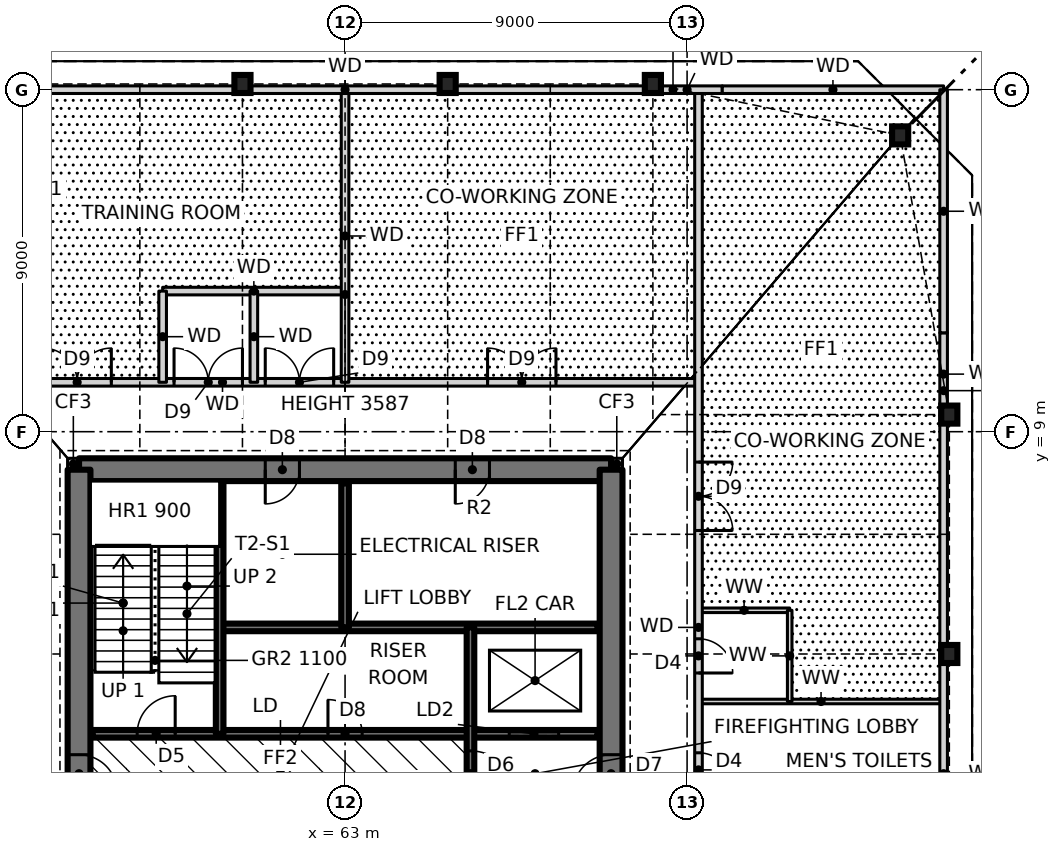
"""IFC4 building model, lengths in metres.
Left out: names, types, materials, properties, quantities, classifications, styles, units other than length and angle.
Written with IfcOpenShell. Run it as: python <this file> out.ifc"""

import sys

from ifc_helpers import new_model, si_unit, direction, frame, frame_2d, origin, origin_2d, place, context, subcontext, project, spatial, rectangle, i_section, extrude, element, fill, save


model = new_model("IFC4")
c1 = context("Model", 3, precision=1e-05, world=origin(), true_north=direction((0.0, 1.0)))
c2 = subcontext(c1, "Body", "Model", "MODEL_VIEW")
j1 = project(units=[si_unit("LENGTHUNIT", "METRE"), si_unit("PLANEANGLEUNIT", "RADIAN")], contexts=[c1])
p1 = place(None, origin())
s1 = spatial("IfcSite", under=j1, at=p1, CompositionType="ELEMENT")
p2 = place(p1, origin())
s2 = spatial("IfcBuilding", under=s1, at=p2, CompositionType="ELEMENT")
p3 = place(p2, frame((0.0, 0.0, 10.5)))
s3 = spatial("IfcBuildingStorey", under=s2, at=p3, CompositionType="ELEMENT", Elevation=10.5)
for number, where, z_axis, x_axis in (
    (1, (78.9, 3.15, 0.0), (0.0, 0.0, 1.0), (1.0, 0.0, 0.0)),
    (2, (78.9, 9.45, 0.0), (0.0, 0.0, 1.0), (1.0, 0.0, 0.0)),
    (3, (77.606, 16.797, 0.0), (0.0, 0.0, 1.0), (1.0, 0.0, 0.0)),
    (4, (71.1, 18.15, 0.0), (0.0, 0.0, 1.0), (1.0, 0.0, 0.0)),
    (5, (65.7, 18.15, 0.0), (0.0, 0.0, 1.0), (1.0, 0.0, 0.0)),
    (6, (60.3, 18.15, 0.0), (0.0, 0.0, 1.0), (1.0, 0.0, 0.0)),
):
    element("IfcColumn", number, at=place(p3, frame(where, z_axis=z_axis, x_axis=x_axis)), inside=s3, PredefinedType="COLUMN", context=c2, shape_type="SweptSolid", body=[
        extrude(i_section(OverallWidth=0.424, OverallDepth=0.475, WebThickness=0.048, FlangeThickness=0.077, at=origin_2d()), origin(), (0.0, 0.0, 1.0), 4.5),
    ])
for number, where, z_axis, x_axis in (
    (7, (70.0, 8.15, 0.0), (0.0, 0.0, 1.0), (1.0, 0.0, 0.0)),
    (8, (55.7, 8.15, 0.0), (0.0, 0.0, 1.0), (1.0, 0.0, 0.0)),
):
    element("IfcWall", number, at=place(p3, frame(where, z_axis=z_axis, x_axis=x_axis)), inside=s3, PredefinedType="SOLIDWALL", context=c2, shape_type="SweptSolid", body=[
        extrude(rectangle(XDim=0.3, YDim=0.3, at=frame_2d((0.15, 0.0))), origin(), (0.0, 0.0, 1.0), 4.5),
    ])
p4 = place(p3, frame((70.0, 8.0, 0.0), z_axis=(0.0, 0.0, 1.0), x_axis=(-1.0, 0.0, 0.0)))
e9 = element("IfcWall", 9, at=p4, inside=s3, PredefinedType="SHEAR", context=c2, shape_type="SweptSolid", body=[
    extrude(rectangle(XDim=14.0, YDim=0.6, at=frame_2d((7.0, 0.0))), origin(), (0.0, 0.0, 1.0), 4.5),
])
p5 = place(p4, frame((8.2, 0.0, 0.0)))
e10 = element("IfcOpeningElement", 10, at=p5, cuts=e9, PredefinedType="OPENING", context=c2, shape_type="SweptSolid", body=[
    extrude(rectangle(XDim=0.9, YDim=2.1, at=frame_2d((0.45, 1.05))), frame((0.0, 0.31, 0.0), z_axis=(0.0, -1.0, 0.0), x_axis=(1.0, 0.0, 0.0)), (0.0, 0.0, 1.0), 0.62),
])
p6 = place(p4, frame((3.2, 0.0, 0.0)))
e11 = element("IfcOpeningElement", 11, at=p6, cuts=e9, PredefinedType="OPENING", context=c2, shape_type="SweptSolid", body=[
    extrude(rectangle(XDim=0.9, YDim=2.1, at=frame_2d((0.45, 1.05))), frame((0.0, 0.31, 0.0), z_axis=(0.0, -1.0, 0.0), x_axis=(1.0, 0.0, 0.0)), (0.0, 0.0, 1.0), 0.62),
])
p7 = place(p3, frame((70.0, -8.0, 0.0), z_axis=(0.0, 0.0, 1.0), x_axis=(0.0, 1.0, 0.0)))
e12 = element("IfcWall", 12, at=p7, inside=s3, PredefinedType="SHEAR", context=c2, shape_type="SweptSolid", body=[
    extrude(rectangle(XDim=16.0, YDim=0.6, at=frame_2d((8.0, 0.0))), origin(), (0.0, 0.0, 1.0), 4.5),
])
p8 = place(p7, frame((7.5, 0.0, 0.0)))
e13 = element("IfcOpeningElement", 13, at=p8, cuts=e12, PredefinedType="OPENING", context=c2, shape_type="SweptSolid", body=[
    extrude(rectangle(XDim=1.0, YDim=2.1, at=frame_2d((0.5, 1.05))), frame((0.0, 0.31, 0.0), z_axis=(0.0, -1.0, 0.0), x_axis=(1.0, 0.0, 0.0)), (0.0, 0.0, 1.0), 0.62),
])
p9 = place(p3, frame((56.0, 8.0, 0.0), z_axis=(0.0, 0.0, 1.0), x_axis=(0.0, -1.0, 0.0)))
e14 = element("IfcWall", 14, at=p9, inside=s3, PredefinedType="SHEAR", context=c2, shape_type="SweptSolid", body=[
    extrude(rectangle(XDim=16.0, YDim=0.6, at=frame_2d((8.0, 0.0))), origin(), (0.0, 0.0, 1.0), 4.5),
])
p10 = place(p9, frame((7.5, 0.0, 0.0)))
e15 = element("IfcOpeningElement", 15, at=p10, cuts=e14, PredefinedType="OPENING", context=c2, shape_type="SweptSolid", body=[
    extrude(rectangle(XDim=1.0, YDim=2.1, at=frame_2d((0.5, 1.05))), frame((0.0, 0.31, 0.0), z_axis=(0.0, -1.0, 0.0), x_axis=(1.0, 0.0, 0.0)), (0.0, 0.0, 1.0), 0.62),
])
p11 = place(p3, frame((56.36, 1.05, 0.0), z_axis=(0.0, 0.0, 1.0), x_axis=(1.0, 0.0, 0.0)))
e16 = element("IfcWall", 16, at=p11, inside=s3, PredefinedType="SOLIDWALL", context=c2, shape_type="SweptSolid", body=[
    extrude(rectangle(XDim=13.28, YDim=0.2, at=frame_2d((6.64, 0.0))), origin(), (0.0, 0.0, 1.0), 4.5),
])
p12 = place(p11, frame((1.17, 0.0, 0.0)))
e17 = element("IfcOpeningElement", 17, at=p12, cuts=e16, PredefinedType="OPENING", context=c2, shape_type="SweptSolid", body=[
    extrude(rectangle(XDim=1.0, YDim=2.1, at=frame_2d((0.5, 1.05))), frame((0.0, 0.11, 0.0), z_axis=(0.0, -1.0, 0.0), x_axis=(1.0, 0.0, 0.0)), (0.0, 0.0, 1.0), 0.22),
])
p13 = place(p11, frame((6.19, 0.0, 0.0)))
e18 = element("IfcOpeningElement", 18, at=p13, cuts=e16, PredefinedType="OPENING", context=c2, shape_type="SweptSolid", body=[
    extrude(rectangle(XDim=0.9, YDim=2.1, at=frame_2d((0.45, 1.05))), frame((0.0, 0.11, 0.0), z_axis=(0.0, -1.0, 0.0), x_axis=(1.0, 0.0, 0.0)), (0.0, 0.0, 1.0), 0.22),
])
p14 = place(p11, frame((10.96, 0.0, 0.0)))
e19 = element("IfcOpeningElement", 19, at=p14, cuts=e16, PredefinedType="OPENING", context=c2, shape_type="SweptSolid", body=[
    extrude(rectangle(XDim=1.3, YDim=2.1, at=frame_2d((0.65, 1.05))), frame((0.0, 0.11, 0.0), z_axis=(0.0, -1.0, 0.0), x_axis=(1.0, 0.0, 0.0)), (0.0, 0.0, 1.0), 0.22),
])
p15 = place(p3, frame((72.3, 1.9, 0.0), z_axis=(0.0, 0.0, 1.0), x_axis=(1.0, 0.0, 0.0)))
e20 = element("IfcWall", 20, at=p15, inside=s3, PredefinedType="PARTITIONING", context=c2, shape_type="SweptSolid", body=[
    extrude(rectangle(XDim=6.45, YDim=0.12, at=frame_2d((3.225, 0.0))), origin(), (0.0, 0.0, 1.0), 4.25),
])
p16 = place(p3, frame((59.7, 3.85, 0.0), z_axis=(0.0, 0.0, 1.0), x_axis=(1.0, 0.0, 0.0)))
e21 = element("IfcWall", 21, at=p16, inside=s3, PredefinedType="SOLIDWALL", context=c2, shape_type="SweptSolid", body=[
    extrude(rectangle(XDim=9.94, YDim=0.2, at=frame_2d((4.97, 0.0))), origin(), (0.0, 0.0, 1.0), 4.5),
])
p17 = place(p3, frame((72.3, 4.3, 0.0), z_axis=(0.0, 0.0, 1.0), x_axis=(1.0, 0.0, 0.0)))
e22 = element("IfcWall", 22, at=p17, inside=s3, PredefinedType="PARTITIONING", context=c2, shape_type="SweptSolid", body=[
    extrude(rectangle(XDim=2.4, YDim=0.12, at=frame_2d((1.2, 0.0))), origin(), (0.0, 0.0, 1.0), 4.25),
])
p18 = place(p3, frame((47.25, 10.3, 0.0), z_axis=(0.0, 0.0, 1.0), x_axis=(1.0, 0.0, 0.0)))
e23 = element("IfcWall", 23, at=p18, inside=s3, PredefinedType="SOLIDWALL", context=c2, shape_type="SweptSolid", body=[
    extrude(rectangle(XDim=25.05, YDim=0.2, at=frame_2d((12.525, 0.0))), origin(), (0.0, 0.0, 1.0), 4.25),
])
p19 = place(p18, frame((19.5, 0.0, 0.0)))
e24 = element("IfcOpeningElement", 24, at=p19, cuts=e23, PredefinedType="OPENING", context=c2, shape_type="SweptSolid", body=[
    extrude(rectangle(XDim=1.8, YDim=2.1, at=frame_2d((0.9, 1.05))), frame((0.0, 0.11, 0.0), z_axis=(0.0, -1.0, 0.0), x_axis=(1.0, 0.0, 0.0)), (0.0, 0.0, 1.0), 0.22),
])
p20 = place(p18, frame((13.65, 0.0, 0.0)))
e25 = element("IfcOpeningElement", 25, at=p20, cuts=e23, PredefinedType="OPENING", context=c2, shape_type="SweptSolid", body=[
    extrude(rectangle(XDim=1.8, YDim=2.1, at=frame_2d((0.9, 1.05))), frame((0.0, 0.11, 0.0), z_axis=(0.0, -1.0, 0.0), x_axis=(1.0, 0.0, 0.0)), (0.0, 0.0, 1.0), 0.22),
])
p21 = place(p18, frame((11.25, 0.0, 0.0)))
e26 = element("IfcOpeningElement", 26, at=p21, cuts=e23, PredefinedType="OPENING", context=c2, shape_type="SweptSolid", body=[
    extrude(rectangle(XDim=1.8, YDim=2.1, at=frame_2d((0.9, 1.05))), frame((0.0, 0.11, 0.0), z_axis=(0.0, -1.0, 0.0), x_axis=(1.0, 0.0, 0.0)), (0.0, 0.0, 1.0), 0.22),
])
p22 = place(p18, frame((7.8, 0.0, 0.0)))
e27 = element("IfcOpeningElement", 27, at=p22, cuts=e23, PredefinedType="OPENING", context=c2, shape_type="SweptSolid", body=[
    extrude(rectangle(XDim=1.8, YDim=2.1, at=frame_2d((0.9, 1.05))), frame((0.0, 0.11, 0.0), z_axis=(0.0, -1.0, 0.0), x_axis=(1.0, 0.0, 0.0)), (0.0, 0.0, 1.0), 0.22),
])
p23 = place(p3, frame((58.2, 12.7, 0.0), z_axis=(0.0, 0.0, 1.0), x_axis=(1.0, 0.0, 0.0)))
e28 = element("IfcWall", 28, at=p23, inside=s3, PredefinedType="SOLIDWALL", context=c2, shape_type="SweptSolid", body=[
    extrude(rectangle(XDim=4.8, YDim=0.2, at=frame_2d((2.4, 0.0))), origin(), (0.0, 0.0, 1.0), 4.25),
])
p24 = place(p3, frame((74.7, 1.9, 0.0), z_axis=(0.0, 0.0, 1.0), x_axis=(0.0, 1.0, 0.0)))
e29 = element("IfcWall", 29, at=p24, inside=s3, PredefinedType="PARTITIONING", context=c2, shape_type="SweptSolid", body=[
    extrude(rectangle(XDim=2.4, YDim=0.12, at=frame_2d((1.2, 0.0))), origin(), (0.0, 0.0, 1.0), 4.25),
])
p25 = place(p3, frame((72.3, -10.3, 0.0), z_axis=(0.0, 0.0, 1.0), x_axis=(0.0, 1.0, 0.0)))
e30 = element("IfcWall", 30, at=p25, inside=s3, PredefinedType="SOLIDWALL", context=c2, shape_type="SweptSolid", body=[
    extrude(rectangle(XDim=28.3, YDim=0.2, at=frame_2d((14.15, 0.0))), origin(), (0.0, 0.0, 1.0), 4.25),
])
p26 = place(p25, frame((1.6, 0.0, 0.0)))
e31 = element("IfcOpeningElement", 31, at=p26, cuts=e30, PredefinedType="OPENING", context=c2, shape_type="SweptSolid", body=[
    extrude(rectangle(XDim=1.8, YDim=2.1, at=frame_2d((0.9, 1.05))), frame((0.0, 0.11, 0.0), z_axis=(0.0, -1.0, 0.0), x_axis=(1.0, 0.0, 0.0)), (0.0, 0.0, 1.0), 0.22),
])
p27 = place(p25, frame((6.35, 0.0, 0.0)))
e32 = element("IfcOpeningElement", 32, at=p27, cuts=e30, PredefinedType="OPENING", context=c2, shape_type="SweptSolid", body=[
    extrude(rectangle(XDim=0.9, YDim=2.1, at=frame_2d((0.45, 1.05))), frame((0.0, 0.11, 0.0), z_axis=(0.0, -1.0, 0.0), x_axis=(1.0, 0.0, 0.0)), (0.0, 0.0, 1.0), 0.22),
])
p28 = place(p25, frame((9.95, 0.0, 0.0)))
e33 = element("IfcOpeningElement", 33, at=p28, cuts=e30, PredefinedType="OPENING", context=c2, shape_type="SweptSolid", body=[
    extrude(rectangle(XDim=0.9, YDim=2.1, at=frame_2d((0.45, 1.05))), frame((0.0, 0.11, 0.0), z_axis=(0.0, -1.0, 0.0), x_axis=(1.0, 0.0, 0.0)), (0.0, 0.0, 1.0), 0.22),
])
p29 = place(p25, frame((12.95, 0.0, 0.0)))
e34 = element("IfcOpeningElement", 34, at=p29, cuts=e30, PredefinedType="OPENING", context=c2, shape_type="SweptSolid", body=[
    extrude(rectangle(XDim=0.9, YDim=2.1, at=frame_2d((0.45, 1.05))), frame((0.0, 0.11, 0.0), z_axis=(0.0, -1.0, 0.0), x_axis=(1.0, 0.0, 0.0)), (0.0, 0.0, 1.0), 0.22),
])
p30 = place(p25, frame((16.7, 0.0, 0.0)))
e35 = element("IfcOpeningElement", 35, at=p30, cuts=e30, PredefinedType="OPENING", context=c2, shape_type="SweptSolid", body=[
    extrude(rectangle(XDim=1.8, YDim=2.1, at=frame_2d((0.9, 1.05))), frame((0.0, 0.11, 0.0), z_axis=(0.0, -1.0, 0.0), x_axis=(1.0, 0.0, 0.0)), (0.0, 0.0, 1.0), 0.22),
])
p31 = place(p3, frame((66.3, -7.64, 0.0), z_axis=(0.0, 0.0, 1.0), x_axis=(0.0, 1.0, 0.0)))
e36 = element("IfcWall", 36, at=p31, inside=s3, PredefinedType="SOLIDWALL", context=c2, shape_type="SweptSolid", body=[
    extrude(rectangle(XDim=11.49, YDim=0.2, at=frame_2d((5.745, 0.0))), origin(), (0.0, 0.0, 1.0), 4.5),
])
p32 = place(p31, frame((7.04, 0.0, 0.0)))
e37 = element("IfcOpeningElement", 37, at=p32, cuts=e36, PredefinedType="OPENING", context=c2, shape_type="SweptSolid", body=[
    extrude(rectangle(XDim=1.2, YDim=2.1, at=frame_2d((0.6, 1.05))), frame((0.0, 0.11, 0.0), z_axis=(0.0, -1.0, 0.0), x_axis=(1.0, 0.0, 0.0)), (0.0, 0.0, 1.0), 0.22),
])
p33 = place(p3, frame((63.0, 3.85, 0.0), z_axis=(0.0, 0.0, 1.0), x_axis=(0.0, 1.0, 0.0)))
e38 = element("IfcWall", 38, at=p33, inside=s3, PredefinedType="SOLIDWALL", context=c2, shape_type="SweptSolid", body=[
    extrude(rectangle(XDim=3.79, YDim=0.2, at=frame_2d((1.895, 0.0))), origin(), (0.0, 0.0, 1.0), 4.5),
])
p34 = place(p3, frame((63.0, 10.3, 0.0), z_axis=(0.0, 0.0, 1.0), x_axis=(0.0, 1.0, 0.0)))
e39 = element("IfcWall", 39, at=p34, inside=s3, PredefinedType="SOLIDWALL", context=c2, shape_type="SweptSolid", body=[
    extrude(rectangle(XDim=7.7, YDim=0.2, at=frame_2d((3.85, 0.0))), origin(), (0.0, 0.0, 1.0), 3.587),
])
p35 = place(p3, frame((60.6, 10.3, 0.0), z_axis=(0.0, 0.0, 1.0), x_axis=(0.0, 1.0, 0.0)))
e40 = element("IfcWall", 40, at=p35, inside=s3, PredefinedType="SOLIDWALL", context=c2, shape_type="SweptSolid", body=[
    extrude(rectangle(XDim=2.4, YDim=0.2, at=frame_2d((1.2, 0.0))), origin(), (0.0, 0.0, 1.0), 4.25),
])
p36 = place(p3, frame((59.7, 1.05, 0.0), z_axis=(0.0, 0.0, 1.0), x_axis=(0.0, 1.0, 0.0)))
e41 = element("IfcWall", 41, at=p36, inside=s3, PredefinedType="SOLIDWALL", context=c2, shape_type="SweptSolid", body=[
    extrude(rectangle(XDim=6.59, YDim=0.2, at=frame_2d((3.295, 0.0))), origin(), (0.0, 0.0, 1.0), 4.5),
])
p37 = place(p3, frame((58.2, 10.3, 0.0), z_axis=(0.0, 0.0, 1.0), x_axis=(0.0, 1.0, 0.0)))
e42 = element("IfcWall", 42, at=p37, inside=s3, PredefinedType="SOLIDWALL", context=c2, shape_type="SweptSolid", body=[
    extrude(rectangle(XDim=2.4, YDim=0.2, at=frame_2d((1.2, 0.0))), origin(), (0.0, 0.0, 1.0), 4.25),
])
p38 = place(p3, frame((54.926, 18.0, 0.0), z_axis=(0.0, 0.0, 1.0), x_axis=(1.0, 0.0, 0.0)))
e43 = element("IfcWall", 43, at=p38, inside=s3, PredefinedType="SOLIDWALL", context=c2, shape_type="SweptSolid", body=[
    extrude(rectangle(XDim=16.148, YDim=0.2, at=frame_2d((8.074, 0.0))), origin(), (0.0, 0.0, 1.0), 4.25),
])
p39 = place(p3, frame((71.074, 18.0, 0.0), z_axis=(0.0, 0.0, 1.0), x_axis=(1.0, 0.0, 0.0)))
e44 = element("IfcWall", 44, at=p39, inside=s3, PredefinedType="SOLIDWALL", context=c2, shape_type="SweptSolid", body=[
    extrude(rectangle(XDim=1.852, YDim=0.2, at=frame_2d((0.926, 0.0))), origin(), (0.0, 0.0, 1.0), 3.587),
])
p40 = place(p3, frame((72.926, 18.0, 0.0), z_axis=(0.0, 0.0, 1.0), x_axis=(1.0, 0.0, 0.0)))
e45 = element("IfcWall", 45, at=p40, inside=s3, PredefinedType="SOLIDWALL", context=c2, shape_type="SweptSolid", body=[
    extrude(rectangle(XDim=5.824, YDim=0.2, at=frame_2d((2.912, 0.0))), origin(), (0.0, 0.0, 1.0), 4.25),
])
p41 = place(p3, frame((78.75, -9.428, 0.0), z_axis=(0.0, 0.0, 1.0), x_axis=(0.0, 1.0, 0.0)))
e46 = element("IfcWall", 46, at=p41, inside=s3, PredefinedType="SOLIDWALL", context=c2, shape_type="SweptSolid", body=[
    extrude(rectangle(XDim=18.856, YDim=0.2, at=frame_2d((9.428, 0.0))), origin(), (0.0, 0.0, 1.0), 4.25),
])
p42 = place(p3, frame((78.75, 9.428, 0.0), z_axis=(0.0, 0.0, 1.0), x_axis=(0.0, 1.0, 0.0)))
e47 = element("IfcWall", 47, at=p42, inside=s3, PredefinedType="SOLIDWALL", context=c2, shape_type="SweptSolid", body=[
    extrude(rectangle(XDim=2.174, YDim=0.2, at=frame_2d((1.087, 0.0))), origin(), (0.0, 0.0, 1.0), 3.587),
])
p43 = place(p3, frame((78.75, 11.602, 0.0), z_axis=(0.0, 0.0, 1.0), x_axis=(0.0, 1.0, 0.0)))
e48 = element("IfcWall", 48, at=p43, inside=s3, PredefinedType="SOLIDWALL", context=c2, shape_type="SweptSolid", body=[
    extrude(rectangle(XDim=6.398, YDim=0.2, at=frame_2d((3.199, 0.0))), origin(), (0.0, 0.0, 1.0), 4.25),
])
p44 = place(p12, origin())
e49 = element("IfcDoor", 49, at=p44, inside=s3, OperationType="SINGLE_SWING_RIGHT", PredefinedType="DOOR", context=c2, shape_type="SweptSolid", body=[
    extrude(rectangle(XDim=1.0, YDim=2.1, at=frame_2d((0.5, 1.05))), frame((0.0, 0.025, 0.0), z_axis=(0.0, -1.0, 0.0), x_axis=(1.0, 0.0, 0.0)), (0.0, 0.0, 1.0), 0.05),
])
fill(e17, e49)
p45 = place(p32, frame((1.2, 0.0, 0.0), z_axis=(0.0, 0.0, 1.0), x_axis=(-1.0, 0.0, 0.0)))
e50 = element("IfcDoor", 50, at=p45, inside=s3, OperationType="SINGLE_SWING_RIGHT", PredefinedType="DOOR", context=c2, shape_type="SweptSolid", body=[
    extrude(rectangle(XDim=1.2, YDim=2.1, at=frame_2d((0.6, 1.05))), frame((0.0, 0.025, 0.0), z_axis=(0.0, -1.0, 0.0), x_axis=(1.0, 0.0, 0.0)), (0.0, 0.0, 1.0), 0.05),
])
fill(e37, e50)
p46 = place(p13, origin())
e51 = element("IfcDoor", 51, at=p46, inside=s3, OperationType="SINGLE_SWING_LEFT", PredefinedType="DOOR", context=c2, shape_type="SweptSolid", body=[
    extrude(rectangle(XDim=0.9, YDim=2.1, at=frame_2d((0.45, 1.05))), frame((0.0, 0.025, 0.0), z_axis=(0.0, -1.0, 0.0), x_axis=(1.0, 0.0, 0.0)), (0.0, 0.0, 1.0), 0.05),
])
fill(e18, e51)
p47 = place(p28, frame((0.9, 0.0, 0.0), z_axis=(0.0, 0.0, 1.0), x_axis=(-1.0, 0.0, 0.0)))
e52 = element("IfcDoor", 52, at=p47, inside=s3, OperationType="SINGLE_SWING_RIGHT", PredefinedType="DOOR", context=c2, shape_type="SweptSolid", body=[
    extrude(rectangle(XDim=0.9, YDim=2.1, at=frame_2d((0.45, 1.05))), frame((0.0, 0.025, 0.0), z_axis=(0.0, -1.0, 0.0), x_axis=(1.0, 0.0, 0.0)), (0.0, 0.0, 1.0), 0.05),
])
fill(e33, e52)
p48 = place(p29, frame((0.9, 0.0, 0.0), z_axis=(0.0, 0.0, 1.0), x_axis=(-1.0, 0.0, 0.0)))
e53 = element("IfcDoor", 53, at=p48, inside=s3, OperationType="SINGLE_SWING_RIGHT", PredefinedType="DOOR", context=c2, shape_type="SweptSolid", body=[
    extrude(rectangle(XDim=0.9, YDim=2.1, at=frame_2d((0.45, 1.05))), frame((0.0, 0.025, 0.0), z_axis=(0.0, -1.0, 0.0), x_axis=(1.0, 0.0, 0.0)), (0.0, 0.0, 1.0), 0.05),
])
fill(e34, e53)
p49 = place(p30, frame((1.8, 0.0, 0.0), z_axis=(0.0, 0.0, 1.0), x_axis=(-1.0, 0.0, 0.0)))
e54 = element("IfcDoor", 54, at=p49, inside=s3, OperationType="DOUBLE_DOOR_SINGLE_SWING", PredefinedType="DOOR", context=c2, shape_type="SweptSolid", body=[
    extrude(rectangle(XDim=1.8, YDim=2.1, at=frame_2d((0.9, 1.05))), frame((0.0, 0.025, 0.0), z_axis=(0.0, -1.0, 0.0), x_axis=(1.0, 0.0, 0.0)), (0.0, 0.0, 1.0), 0.05),
])
fill(e35, e54)
p50 = place(p19, origin())
e55 = element("IfcDoor", 55, at=p50, inside=s3, OperationType="DOUBLE_DOOR_SINGLE_SWING", PredefinedType="DOOR", context=c2, shape_type="SweptSolid", body=[
    extrude(rectangle(XDim=1.8, YDim=2.1, at=frame_2d((0.9, 1.05))), frame((0.0, 0.025, 0.0), z_axis=(0.0, -1.0, 0.0), x_axis=(1.0, 0.0, 0.0)), (0.0, 0.0, 1.0), 0.05),
])
fill(e24, e55)
p51 = place(p20, origin())
e56 = element("IfcDoor", 56, at=p51, inside=s3, OperationType="DOUBLE_DOOR_SINGLE_SWING", PredefinedType="DOOR", context=c2, shape_type="SweptSolid", body=[
    extrude(rectangle(XDim=1.8, YDim=2.1, at=frame_2d((0.9, 1.05))), frame((0.0, 0.025, 0.0), z_axis=(0.0, -1.0, 0.0), x_axis=(1.0, 0.0, 0.0)), (0.0, 0.0, 1.0), 0.05),
])
fill(e25, e56)
p52 = place(p21, origin())
e57 = element("IfcDoor", 57, at=p52, inside=s3, OperationType="DOUBLE_DOOR_SINGLE_SWING", PredefinedType="DOOR", context=c2, shape_type="SweptSolid", body=[
    extrude(rectangle(XDim=1.8, YDim=2.1, at=frame_2d((0.9, 1.05))), frame((0.0, 0.025, 0.0), z_axis=(0.0, -1.0, 0.0), x_axis=(1.0, 0.0, 0.0)), (0.0, 0.0, 1.0), 0.05),
])
fill(e26, e57)
p53 = place(p22, origin())
e58 = element("IfcDoor", 58, at=p53, inside=s3, OperationType="DOUBLE_DOOR_SINGLE_SWING", PredefinedType="DOOR", context=c2, shape_type="SweptSolid", body=[
    extrude(rectangle(XDim=1.8, YDim=2.1, at=frame_2d((0.9, 1.05))), frame((0.0, 0.025, 0.0), z_axis=(0.0, -1.0, 0.0), x_axis=(1.0, 0.0, 0.0)), (0.0, 0.0, 1.0), 0.05),
])
fill(e27, e58)
p54 = place(p10, origin())
e59 = element("IfcDoor", 59, at=p54, inside=s3, OperationType="SINGLE_SWING_RIGHT", PredefinedType="DOOR", context=c2, shape_type="SweptSolid", body=[
    extrude(rectangle(XDim=1.0, YDim=2.1, at=frame_2d((0.5, 1.05))), frame((0.0, 0.025, 0.0), z_axis=(0.0, -1.0, 0.0), x_axis=(1.0, 0.0, 0.0)), (0.0, 0.0, 1.0), 0.05),
])
fill(e15, e59)
p55 = place(p8, origin())
e60 = element("IfcDoor", 60, at=p55, inside=s3, OperationType="SINGLE_SWING_LEFT", PredefinedType="DOOR", context=c2, shape_type="SweptSolid", body=[
    extrude(rectangle(XDim=1.0, YDim=2.1, at=frame_2d((0.5, 1.05))), frame((0.0, 0.025, 0.0), z_axis=(0.0, -1.0, 0.0), x_axis=(1.0, 0.0, 0.0)), (0.0, 0.0, 1.0), 0.05),
])
fill(e13, e60)
p56 = place(p5, origin())
e61 = element("IfcDoor", 61, at=p56, inside=s3, OperationType="SINGLE_SWING_RIGHT", PredefinedType="DOOR", context=c2, shape_type="SweptSolid", body=[
    extrude(rectangle(XDim=0.9, YDim=2.1, at=frame_2d((0.45, 1.05))), frame((0.0, 0.025, 0.0), z_axis=(0.0, -1.0, 0.0), x_axis=(1.0, 0.0, 0.0)), (0.0, 0.0, 1.0), 0.05),
])
fill(e10, e61)
p57 = place(p6, origin())
e62 = element("IfcDoor", 62, at=p57, inside=s3, OperationType="SINGLE_SWING_RIGHT", PredefinedType="DOOR", context=c2, shape_type="SweptSolid", body=[
    extrude(rectangle(XDim=0.9, YDim=2.1, at=frame_2d((0.45, 1.05))), frame((0.0, 0.025, 0.0), z_axis=(0.0, -1.0, 0.0), x_axis=(1.0, 0.0, 0.0)), (0.0, 0.0, 1.0), 0.05),
])
fill(e11, e62)
p58 = place(p14, origin())
e63 = element("IfcDoor", 63, at=p58, inside=s3, OperationType="SLIDING_TO_LEFT", PredefinedType="DOOR", context=c2, shape_type="SweptSolid", body=[
    extrude(rectangle(XDim=1.3, YDim=2.1, at=frame_2d((0.65, 1.05))), frame((0.0, 0.025, 0.0), z_axis=(0.0, -1.0, 0.0), x_axis=(1.0, 0.0, 0.0)), (0.0, 0.0, 1.0), 0.05),
])
fill(e19, e63)
save(model, sys.argv[1])
